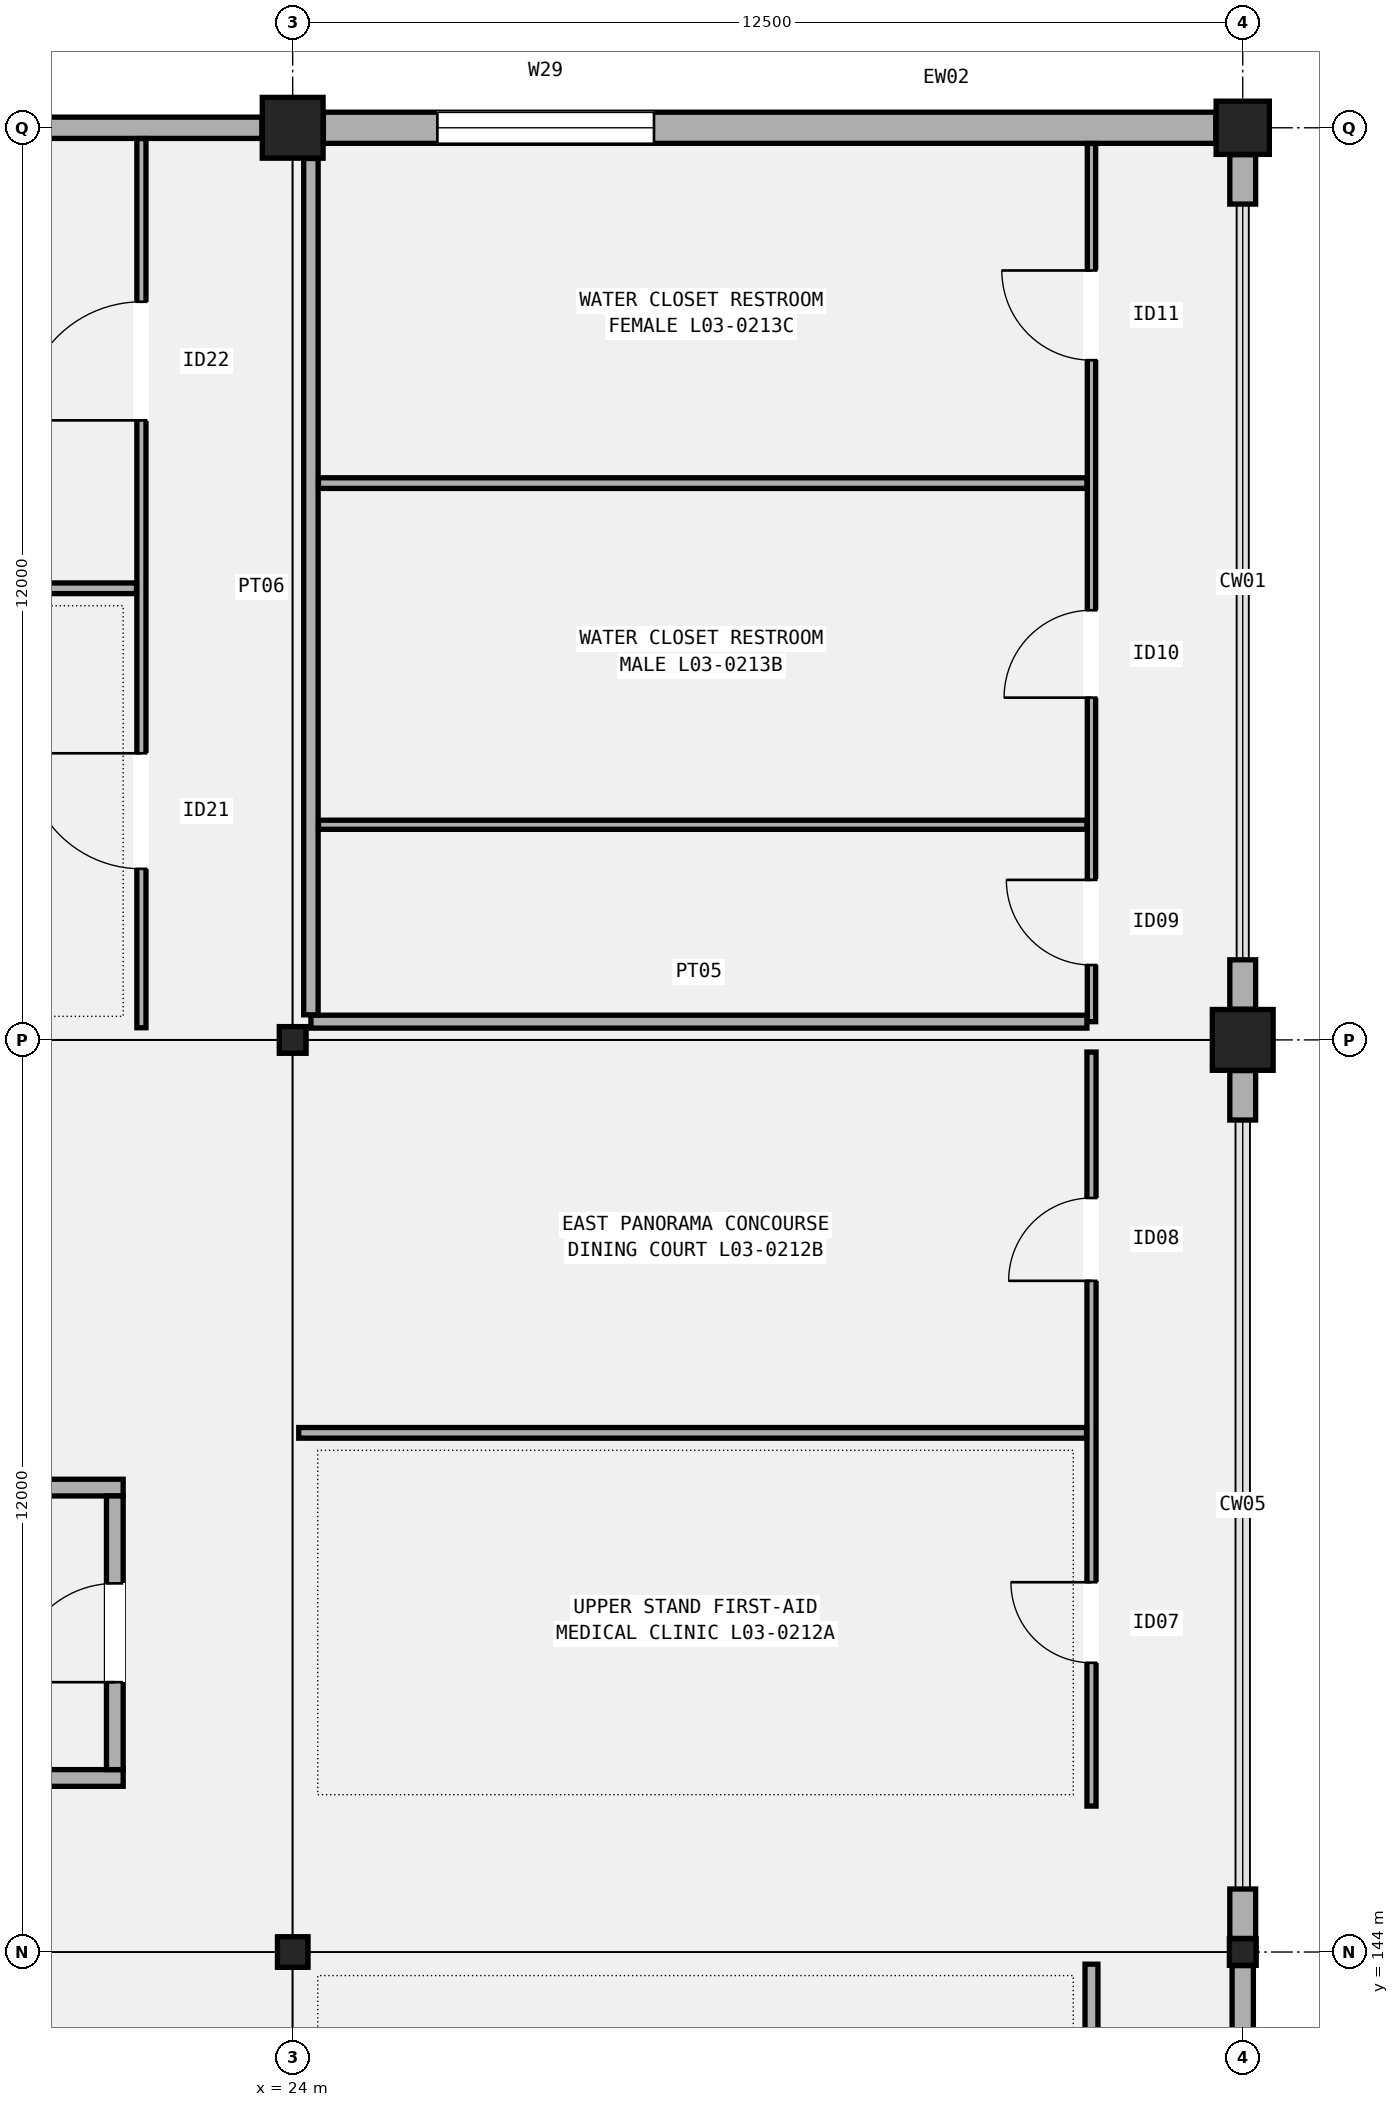
"""IFC4 building model, lengths in metres.
Left out: names, types, materials, properties, quantities, classifications, styles, units other than length and angle.
Written with IfcOpenShell. Run it as: python <this file> out.ifc"""

import sys

from ifc_helpers import new_model, si_unit, direction, frame, frame_2d, origin, origin_2d, place, context, subcontext, project, spatial, rectangle, hollow_rectangle, extrude, element, fill, save


model = new_model("IFC4")
c1 = context("Model", 3, precision=1e-05, world=origin(), true_north=direction((0.0, 1.0)))
c2 = subcontext(c1, "Body", "Model", "MODEL_VIEW")
j1 = project(units=[si_unit("LENGTHUNIT", "METRE"), si_unit("PLANEANGLEUNIT", "RADIAN")], contexts=[c1])
p1 = place(None, origin())
s1 = spatial("IfcSite", under=j1, at=p1, CompositionType="ELEMENT")
p2 = place(p1, origin())
s2 = spatial("IfcBuilding", under=s1, at=p2, CompositionType="ELEMENT")
p3 = place(p2, frame((0.0, 0.0, 15.3)))
s3 = spatial("IfcBuildingStorey", under=s2, at=p3, CompositionType="ELEMENT", Elevation=15.3)
p4 = place(p3, frame((24.0, 144.0, 0.0), z_axis=(0.0, 0.0, 1.0), x_axis=(1.0, 0.0, 0.0)))
e1 = element("IfcColumn", 1, at=p4, inside=s3, PredefinedType="COLUMN", context=c2, shape_type="SweptSolid", body=[
    extrude(hollow_rectangle(XDim=0.4, YDim=0.4, WallThickness=0.016, InnerFilletRadius=0.016, OuterFilletRadius=0.032, at=origin_2d()), origin(), (0.0, 0.0, 1.0), 5.1),
])
p5 = place(p3, frame((24.0, 156.0, 0.0), z_axis=(0.0, 0.0, 1.0), x_axis=(1.0, 0.0, 0.0)))
e2 = element("IfcColumn", 2, at=p5, inside=s3, PredefinedType="COLUMN", context=c2, shape_type="SweptSolid", body=[
    extrude(hollow_rectangle(XDim=0.35, YDim=0.35, WallThickness=0.016, InnerFilletRadius=0.016, OuterFilletRadius=0.032, at=origin_2d()), origin(), (0.0, 0.0, 1.0), 5.1),
])
p6 = place(p3, frame((24.0, 168.0, 0.0), z_axis=(0.0, 0.0, 1.0), x_axis=(1.0, 0.0, 0.0)))
e3 = element("IfcColumn", 3, at=p6, inside=s3, PredefinedType="COLUMN", context=c2, shape_type="SweptSolid", body=[
    extrude(rectangle(XDim=0.8, YDim=0.8, at=origin_2d()), origin(), (0.0, 0.0, 1.0), 5.1),
])
p7 = place(p3, frame((36.5, 144.0, 0.0), z_axis=(0.0, 0.0, 1.0), x_axis=(1.0, 0.0, 0.0)))
e4 = element("IfcColumn", 4, at=p7, inside=s3, PredefinedType="COLUMN", context=c2, shape_type="SweptSolid", body=[
    extrude(hollow_rectangle(XDim=0.35, YDim=0.35, WallThickness=0.016, InnerFilletRadius=0.016, OuterFilletRadius=0.032, at=origin_2d()), origin(), (0.0, 0.0, 1.0), 5.1),
])
p8 = place(p3, frame((36.5, 156.0, 0.0), z_axis=(0.0, 0.0, 1.0), x_axis=(1.0, 0.0, 0.0)))
e5 = element("IfcColumn", 5, at=p8, inside=s3, PredefinedType="COLUMN", context=c2, shape_type="SweptSolid", body=[
    extrude(rectangle(XDim=0.8, YDim=0.8, at=origin_2d()), origin(), (0.0, 0.0, 1.0), 5.1),
])
p9 = place(p3, frame((36.5, 168.0, 0.0), z_axis=(0.0, 0.0, 1.0), x_axis=(1.0, 0.0, 0.0)))
e6 = element("IfcColumn", 6, at=p9, inside=s3, PredefinedType="COLUMN", context=c2, shape_type="SweptSolid", body=[
    extrude(rectangle(XDim=0.7, YDim=0.7, at=origin_2d()), origin(), (0.0, 0.0, 1.0), 5.1),
])
p10 = place(p3, frame((12.179, 168.0, 0.0), z_axis=(0.0, 0.0, 1.0), x_axis=(1.0, 0.0, 0.0)))
e7 = element("IfcWall", 7, at=p10, inside=s3, PredefinedType="SOLIDWALL", context=c2, shape_type="SweptSolid", body=[
    extrude(rectangle(XDim=11.417, YDim=0.28, at=frame_2d((5.708, 0.0))), origin(), (0.0, 0.0, 1.0), 4.06),
])
p11 = place(p10, frame((1.5, 0.0, 0.95)))
e8 = element("IfcOpeningElement", 8, at=p11, cuts=e7, PredefinedType="OPENING", context=c2, shape_type="SweptSolid", body=[
    extrude(rectangle(XDim=2.25, YDim=2.2, at=frame_2d((1.125, 1.1))), frame((0.0, 0.15, 0.0), z_axis=(0.0, -1.0, 0.0), x_axis=(1.0, 0.0, 0.0)), (0.0, 0.0, 1.0), 0.3),
])
p12 = place(p3, frame((36.5, 132.204, 0.0), z_axis=(0.0, 0.0, 1.0), x_axis=(0.0, 1.0, 0.0)))
e9 = element("IfcWall", 9, at=p12, inside=s3, PredefinedType="SOLIDWALL", context=c2, shape_type="SweptSolid", body=[
    extrude(rectangle(XDim=11.617, YDim=0.28, at=frame_2d((5.809, 0.0))), origin(), (0.0, 0.0, 1.0), 4.172),
])
p13 = place(p12, frame((1.5, 0.0, 0.95)))
e10 = element("IfcOpeningElement", 10, at=p13, cuts=e9, PredefinedType="OPENING", context=c2, shape_type="SweptSolid", body=[
    extrude(rectangle(XDim=2.7, YDim=2.2, at=frame_2d((1.35, 1.1))), frame((0.0, 0.15, 0.0), z_axis=(0.0, -1.0, 0.0), x_axis=(1.0, 0.0, 0.0)), (0.0, 0.0, 1.0), 0.3),
])
p14 = place(p3, frame((36.5, 144.179, 0.0), z_axis=(0.0, 0.0, 1.0), x_axis=(0.0, 1.0, 0.0)))
e11 = element("IfcWall", 11, at=p14, inside=s3, PredefinedType="SOLIDWALL", context=c2, shape_type="SweptSolid", body=[
    extrude(rectangle(XDim=0.65, YDim=0.34, at=frame_2d((0.325, 0.0))), origin(), (0.0, 0.0, 1.0), 4.06),
])
p15 = place(p3, frame((36.5, 154.946, 0.0), z_axis=(0.0, 0.0, 1.0), x_axis=(0.0, 1.0, 0.0)))
e12 = element("IfcWall", 12, at=p15, inside=s3, PredefinedType="SOLIDWALL", context=c2, shape_type="SweptSolid", body=[
    extrude(rectangle(XDim=0.65, YDim=0.34, at=frame_2d((0.325, 0.0))), origin(), (0.0, 0.0, 1.0), 4.06),
])
p16 = place(p3, frame((24.404, 168.0, 0.0), z_axis=(0.0, 0.0, 1.0), x_axis=(1.0, 0.0, 0.0)))
e13 = element("IfcWall", 13, at=p16, inside=s3, PredefinedType="SOLIDWALL", context=c2, shape_type="SweptSolid", body=[
    extrude(rectangle(XDim=11.742, YDim=0.41, at=frame_2d((5.871, 0.0))), origin(), (0.0, 0.0, 1.0), 4.16),
])
p17 = place(p16, frame((1.5, 0.0, 0.95)))
e14 = element("IfcOpeningElement", 14, at=p17, cuts=e13, PredefinedType="OPENING", context=c2, shape_type="SweptSolid", body=[
    extrude(rectangle(XDim=2.85, YDim=2.0, at=frame_2d((1.425, 1.0))), frame((0.0, 0.215, 0.0), z_axis=(0.0, -1.0, 0.0), x_axis=(1.0, 0.0, 0.0)), (0.0, 0.0, 1.0), 0.43),
])
for number, where, z_axis, x_axis in (
    (15, (36.5, 156.404, 0.0), (0.0, 0.0, 1.0), (0.0, 1.0, 0.0)),
    (16, (36.5, 166.996, 0.0), (0.0, 0.0, 1.0), (0.0, 1.0, 0.0)),
):
    element("IfcWall", number, at=place(p3, frame(where, z_axis=z_axis, x_axis=x_axis)), inside=s3, PredefinedType="SOLIDWALL", context=c2, shape_type="SweptSolid", body=[
        extrude(rectangle(XDim=0.65, YDim=0.34, at=frame_2d((0.325, 0.0))), origin(), (0.0, 0.0, 1.0), 4.16),
    ])
for number, where, z_axis, x_axis in (
    (17, (17.48, 146.29, 0.0), (0.0, 0.0, 1.0), (1.0, 0.0, 0.0)),
    (18, (17.48, 150.11, 0.0), (0.0, 0.0, 1.0), (1.0, 0.0, 0.0)),
):
    element("IfcWall", number, at=place(p3, frame(where, z_axis=z_axis, x_axis=x_axis)), inside=s3, PredefinedType="SOLIDWALL", context=c2, shape_type="SweptSolid", body=[
        extrude(rectangle(XDim=4.29, YDim=0.22, at=frame_2d((2.145, 0.0))), origin(), (0.0, 0.0, 1.0), 4.22),
    ])
p18 = place(p3, frame((21.66, 146.4, 0.0), z_axis=(0.0, 0.0, 1.0), x_axis=(0.0, 1.0, 0.0)))
e19 = element("IfcWall", 19, at=p18, inside=s3, PredefinedType="SOLIDWALL", context=c2, shape_type="SweptSolid", body=[
    extrude(rectangle(XDim=3.6, YDim=0.22, at=frame_2d((1.8, 0.0))), origin(), (0.0, 0.0, 1.0), 4.22),
])
p19 = place(p18, frame((1.15, 0.0, 0.0)))
e20 = element("IfcOpeningElement", 20, at=p19, cuts=e19, PredefinedType="OPENING", context=c2, shape_type="SweptSolid", body=[
    extrude(rectangle(XDim=1.3, YDim=2.15, at=frame_2d((0.65, 1.075))), frame((0.0, 0.12, 0.0), z_axis=(0.0, -1.0, 0.0), x_axis=(1.0, 0.0, 0.0)), (0.0, 0.0, 1.0), 0.24),
])
p20 = place(p3, frame((22.01, 156.16, 0.0), z_axis=(0.0, 0.0, 1.0), x_axis=(0.0, 1.0, 0.0)))
e21 = element("IfcWall", 21, at=p20, inside=s3, PredefinedType="PARTITIONING", context=c2, shape_type="SweptSolid", body=[
    extrude(rectangle(XDim=11.698, YDim=0.12, at=frame_2d((5.849, 0.0))), origin(), (0.0, 0.0, 1.0), 4.22),
])
p21 = place(p20, frame((2.091, 0.0, 0.0)))
e22 = element("IfcOpeningElement", 22, at=p21, cuts=e21, PredefinedType="OPENING", context=c2, shape_type="SweptSolid", body=[
    extrude(rectangle(XDim=1.52, YDim=2.28, at=frame_2d((0.76, 1.14))), frame((0.0, 0.07, 0.0), z_axis=(0.0, -1.0, 0.0), x_axis=(1.0, 0.0, 0.0)), (0.0, 0.0, 1.0), 0.14),
])
p22 = place(p20, frame((7.991, 0.0, 0.0)))
e23 = element("IfcOpeningElement", 23, at=p22, cuts=e21, PredefinedType="OPENING", context=c2, shape_type="SweptSolid", body=[
    extrude(rectangle(XDim=1.56, YDim=2.26, at=frame_2d((0.78, 1.13))), frame((0.0, 0.07, 0.0), z_axis=(0.0, -1.0, 0.0), x_axis=(1.0, 0.0, 0.0)), (0.0, 0.0, 1.0), 0.14),
])
p23 = place(p3, frame((12.08, 161.942, 0.0), z_axis=(0.0, 0.0, 1.0), x_axis=(1.0, 0.0, 0.0)))
e24 = element("IfcWall", 24, at=p23, inside=s3, PredefinedType="PARTITIONING", context=c2, shape_type="SweptSolid", body=[
    extrude(rectangle(XDim=9.865, YDim=0.14, at=frame_2d((4.933, 0.0))), origin(), (0.0, 0.0, 1.0), 4.22),
])
p24 = place(p3, frame((34.51, 132.16, 0.0), z_axis=(0.0, 0.0, 1.0), x_axis=(0.0, 1.0, 0.0)))
e25 = element("IfcWall", 25, at=p24, inside=s3, PredefinedType="PARTITIONING", context=c2, shape_type="SweptSolid", body=[
    extrude(rectangle(XDim=11.68, YDim=0.17, at=frame_2d((5.84, 0.0))), origin(), (0.0, 0.0, 1.0), 2.77),
])
p25 = place(p24, frame((5.325, 0.0, 0.0)))
e26 = element("IfcOpeningElement", 26, at=p25, cuts=e25, PredefinedType="OPENING", context=c2, shape_type="SweptSolid", body=[
    extrude(rectangle(XDim=1.03, YDim=2.12, at=frame_2d((0.515, 1.06))), frame((0.0, 0.095, 0.0), z_axis=(0.0, -1.0, 0.0), x_axis=(1.0, 0.0, 0.0)), (0.0, 0.0, 1.0), 0.19),
])
p26 = place(p3, frame((34.51, 145.92, 0.0), z_axis=(0.0, 0.0, 1.0), x_axis=(0.0, 1.0, 0.0)))
e27 = element("IfcWall", 27, at=p26, inside=s3, PredefinedType="PARTITIONING", context=c2, shape_type="SweptSolid", body=[
    extrude(rectangle(XDim=9.92, YDim=0.12, at=frame_2d((4.96, 0.0))), origin(), (0.0, 0.0, 1.0), 4.22),
])
p27 = place(p26, frame((1.885, 0.0, 0.0)))
e28 = element("IfcOpeningElement", 28, at=p27, cuts=e27, PredefinedType="OPENING", context=c2, shape_type="SweptSolid", body=[
    extrude(rectangle(XDim=1.06, YDim=2.15, at=frame_2d((0.53, 1.075))), frame((0.0, 0.07, 0.0), z_axis=(0.0, -1.0, 0.0), x_axis=(1.0, 0.0, 0.0)), (0.0, 0.0, 1.0), 0.14),
])
p28 = place(p26, frame((6.91, 0.0, 0.0)))
e29 = element("IfcOpeningElement", 29, at=p28, cuts=e27, PredefinedType="OPENING", context=c2, shape_type="SweptSolid", body=[
    extrude(rectangle(XDim=1.09, YDim=2.16, at=frame_2d((0.545, 1.08))), frame((0.0, 0.07, 0.0), z_axis=(0.0, -1.0, 0.0), x_axis=(1.0, 0.0, 0.0)), (0.0, 0.0, 1.0), 0.14),
])
p29 = place(p3, frame((24.08, 150.83, 0.0), z_axis=(0.0, 0.0, 1.0), x_axis=(1.0, 0.0, 0.0)))
e30 = element("IfcWall", 30, at=p29, inside=s3, PredefinedType="PARTITIONING", context=c2, shape_type="SweptSolid", body=[
    extrude(rectangle(XDim=10.365, YDim=0.14, at=frame_2d((5.183, 0.0))), origin(), (0.0, 0.0, 1.0), 4.22),
])
p30 = place(p3, frame((34.51, 156.24, 0.0), z_axis=(0.0, 0.0, 1.0), x_axis=(0.0, 1.0, 0.0)))
e31 = element("IfcWall", 31, at=p30, inside=s3, PredefinedType="PARTITIONING", context=c2, shape_type="SweptSolid", body=[
    extrude(rectangle(XDim=11.553, YDim=0.11, at=frame_2d((5.776, 0.0))), origin(), (0.0, 0.0, 1.0), 4.22),
])
p31 = place(p30, frame((0.745, 0.0, 0.0)))
e32 = element("IfcOpeningElement", 32, at=p31, cuts=e31, PredefinedType="OPENING", context=c2, shape_type="SweptSolid", body=[
    extrude(rectangle(XDim=1.12, YDim=2.18, at=frame_2d((0.56, 1.09))), frame((0.0, 0.065, 0.0), z_axis=(0.0, -1.0, 0.0), x_axis=(1.0, 0.0, 0.0)), (0.0, 0.0, 1.0), 0.13),
])
p32 = place(p30, frame((4.263, 0.0, 0.0)))
e33 = element("IfcOpeningElement", 33, at=p32, cuts=e31, PredefinedType="OPENING", context=c2, shape_type="SweptSolid", body=[
    extrude(rectangle(XDim=1.15, YDim=2.15, at=frame_2d((0.575, 1.075))), frame((0.0, 0.065, 0.0), z_axis=(0.0, -1.0, 0.0), x_axis=(1.0, 0.0, 0.0)), (0.0, 0.0, 1.0), 0.13),
])
p33 = place(p30, frame((8.703, 0.0, 0.0)))
e34 = element("IfcOpeningElement", 34, at=p33, cuts=e31, PredefinedType="OPENING", context=c2, shape_type="SweptSolid", body=[
    extrude(rectangle(XDim=1.18, YDim=2.2, at=frame_2d((0.59, 1.1))), frame((0.0, 0.065, 0.0), z_axis=(0.0, -1.0, 0.0), x_axis=(1.0, 0.0, 0.0)), (0.0, 0.0, 1.0), 0.13),
])
p34 = place(p3, frame((24.24, 156.24, 0.0), z_axis=(0.0, 0.0, 1.0), x_axis=(1.0, 0.0, 0.0)))
e35 = element("IfcWall", 35, at=p34, inside=s3, PredefinedType="PARTITIONING", context=c2, shape_type="SweptSolid", body=[
    extrude(rectangle(XDim=10.21, YDim=0.17, at=frame_2d((5.105, 0.0))), origin(), (0.0, 0.0, 1.0), 4.02),
])
p35 = place(p3, frame((24.24, 156.33, 0.0), z_axis=(0.0, 0.0, 1.0), x_axis=(0.0, 1.0, 0.0)))
e36 = element("IfcWall", 36, at=p35, inside=s3, PredefinedType="PARTITIONING", context=c2, shape_type="SweptSolid", body=[
    extrude(rectangle(XDim=11.266, YDim=0.19, at=frame_2d((5.633, 0.0))), origin(), (0.0, 0.0, 1.0), 4.02),
])
p36 = place(p3, frame((24.34, 158.83, 0.0), z_axis=(0.0, 0.0, 1.0), x_axis=(1.0, 0.0, 0.0)))
e37 = element("IfcWall", 37, at=p36, inside=s3, PredefinedType="PARTITIONING", context=c2, shape_type="SweptSolid", body=[
    extrude(rectangle(XDim=10.11, YDim=0.12, at=frame_2d((5.055, 0.0))), origin(), (0.0, 0.0, 1.0), 4.22),
])
p37 = place(p3, frame((24.34, 163.325, 0.0), z_axis=(0.0, 0.0, 1.0), x_axis=(1.0, 0.0, 0.0)))
e38 = element("IfcWall", 38, at=p37, inside=s3, PredefinedType="PARTITIONING", context=c2, shape_type="SweptSolid", body=[
    extrude(rectangle(XDim=10.11, YDim=0.14, at=frame_2d((5.055, 0.0))), origin(), (0.0, 0.0, 1.0), 4.22),
])
p38 = place(p17, origin())
e39 = element("IfcWindow", 39, at=p38, inside=s3, PartitioningType="SINGLE_PANEL", PredefinedType="WINDOW", context=c2, shape_type="SweptSolid", body=[
    extrude(rectangle(XDim=2.85, YDim=2.0, at=frame_2d((1.425, 1.0))), frame((0.0, 0.03, 0.0), z_axis=(0.0, -1.0, 0.0), x_axis=(1.0, 0.0, 0.0)), (0.0, 0.0, 1.0), 0.06),
])
fill(e14, e39)
p39 = place(p19, origin())
e40 = element("IfcDoor", 40, at=p39, inside=s3, OperationType="SINGLE_SWING_LEFT", PredefinedType="DOOR", context=c2, shape_type="SweptSolid", body=[
    extrude(rectangle(XDim=1.3, YDim=2.15, at=frame_2d((0.65, 1.075))), frame((0.0, 0.025, 0.0), z_axis=(0.0, -1.0, 0.0), x_axis=(1.0, 0.0, 0.0)), (0.0, 0.0, 1.0), 0.05),
])
fill(e20, e40)
p40 = place(p21, origin())
e41 = element("IfcDoor", 41, at=p40, inside=s3, OperationType="SINGLE_SWING_RIGHT", PredefinedType="DOOR", context=c2, shape_type="SweptSolid", body=[
    extrude(rectangle(XDim=1.52, YDim=2.28, at=frame_2d((0.76, 1.14))), frame((0.0, 0.025, 0.0), z_axis=(0.0, -1.0, 0.0), x_axis=(1.0, 0.0, 0.0)), (0.0, 0.0, 1.0), 0.05),
])
fill(e22, e41)
p41 = place(p22, origin())
e42 = element("IfcDoor", 42, at=p41, inside=s3, OperationType="SINGLE_SWING_LEFT", PredefinedType="DOOR", context=c2, shape_type="SweptSolid", body=[
    extrude(rectangle(XDim=1.56, YDim=2.26, at=frame_2d((0.78, 1.13))), frame((0.0, 0.025, 0.0), z_axis=(0.0, -1.0, 0.0), x_axis=(1.0, 0.0, 0.0)), (0.0, 0.0, 1.0), 0.05),
])
fill(e23, e42)
p42 = place(p27, origin())
e43 = element("IfcDoor", 43, at=p42, inside=s3, OperationType="SINGLE_SWING_RIGHT", PredefinedType="DOOR", context=c2, shape_type="SweptSolid", body=[
    extrude(rectangle(XDim=1.06, YDim=2.15, at=frame_2d((0.53, 1.075))), frame((0.0, 0.025, 0.0), z_axis=(0.0, -1.0, 0.0), x_axis=(1.0, 0.0, 0.0)), (0.0, 0.0, 1.0), 0.05),
])
fill(e28, e43)
p43 = place(p28, origin())
e44 = element("IfcDoor", 44, at=p43, inside=s3, OperationType="SINGLE_SWING_LEFT", PredefinedType="DOOR", context=c2, shape_type="SweptSolid", body=[
    extrude(rectangle(XDim=1.09, YDim=2.16, at=frame_2d((0.545, 1.08))), frame((0.0, 0.025, 0.0), z_axis=(0.0, -1.0, 0.0), x_axis=(1.0, 0.0, 0.0)), (0.0, 0.0, 1.0), 0.05),
])
fill(e29, e44)
p44 = place(p31, origin())
e45 = element("IfcDoor", 45, at=p44, inside=s3, OperationType="SINGLE_SWING_RIGHT", PredefinedType="DOOR", context=c2, shape_type="SweptSolid", body=[
    extrude(rectangle(XDim=1.12, YDim=2.18, at=frame_2d((0.56, 1.09))), frame((0.0, 0.025, 0.0), z_axis=(0.0, -1.0, 0.0), x_axis=(1.0, 0.0, 0.0)), (0.0, 0.0, 1.0), 0.05),
])
fill(e32, e45)
p45 = place(p32, origin())
e46 = element("IfcDoor", 46, at=p45, inside=s3, OperationType="SINGLE_SWING_LEFT", PredefinedType="DOOR", context=c2, shape_type="SweptSolid", body=[
    extrude(rectangle(XDim=1.15, YDim=2.15, at=frame_2d((0.575, 1.075))), frame((0.0, 0.025, 0.0), z_axis=(0.0, -1.0, 0.0), x_axis=(1.0, 0.0, 0.0)), (0.0, 0.0, 1.0), 0.05),
])
fill(e33, e46)
p46 = place(p33, origin())
e47 = element("IfcDoor", 47, at=p46, inside=s3, OperationType="SINGLE_SWING_RIGHT", PredefinedType="DOOR", context=c2, shape_type="SweptSolid", body=[
    extrude(rectangle(XDim=1.18, YDim=2.2, at=frame_2d((0.59, 1.1))), frame((0.0, 0.025, 0.0), z_axis=(0.0, -1.0, 0.0), x_axis=(1.0, 0.0, 0.0)), (0.0, 0.0, 1.0), 0.05),
])
fill(e34, e47)
save(model, sys.argv[1])
